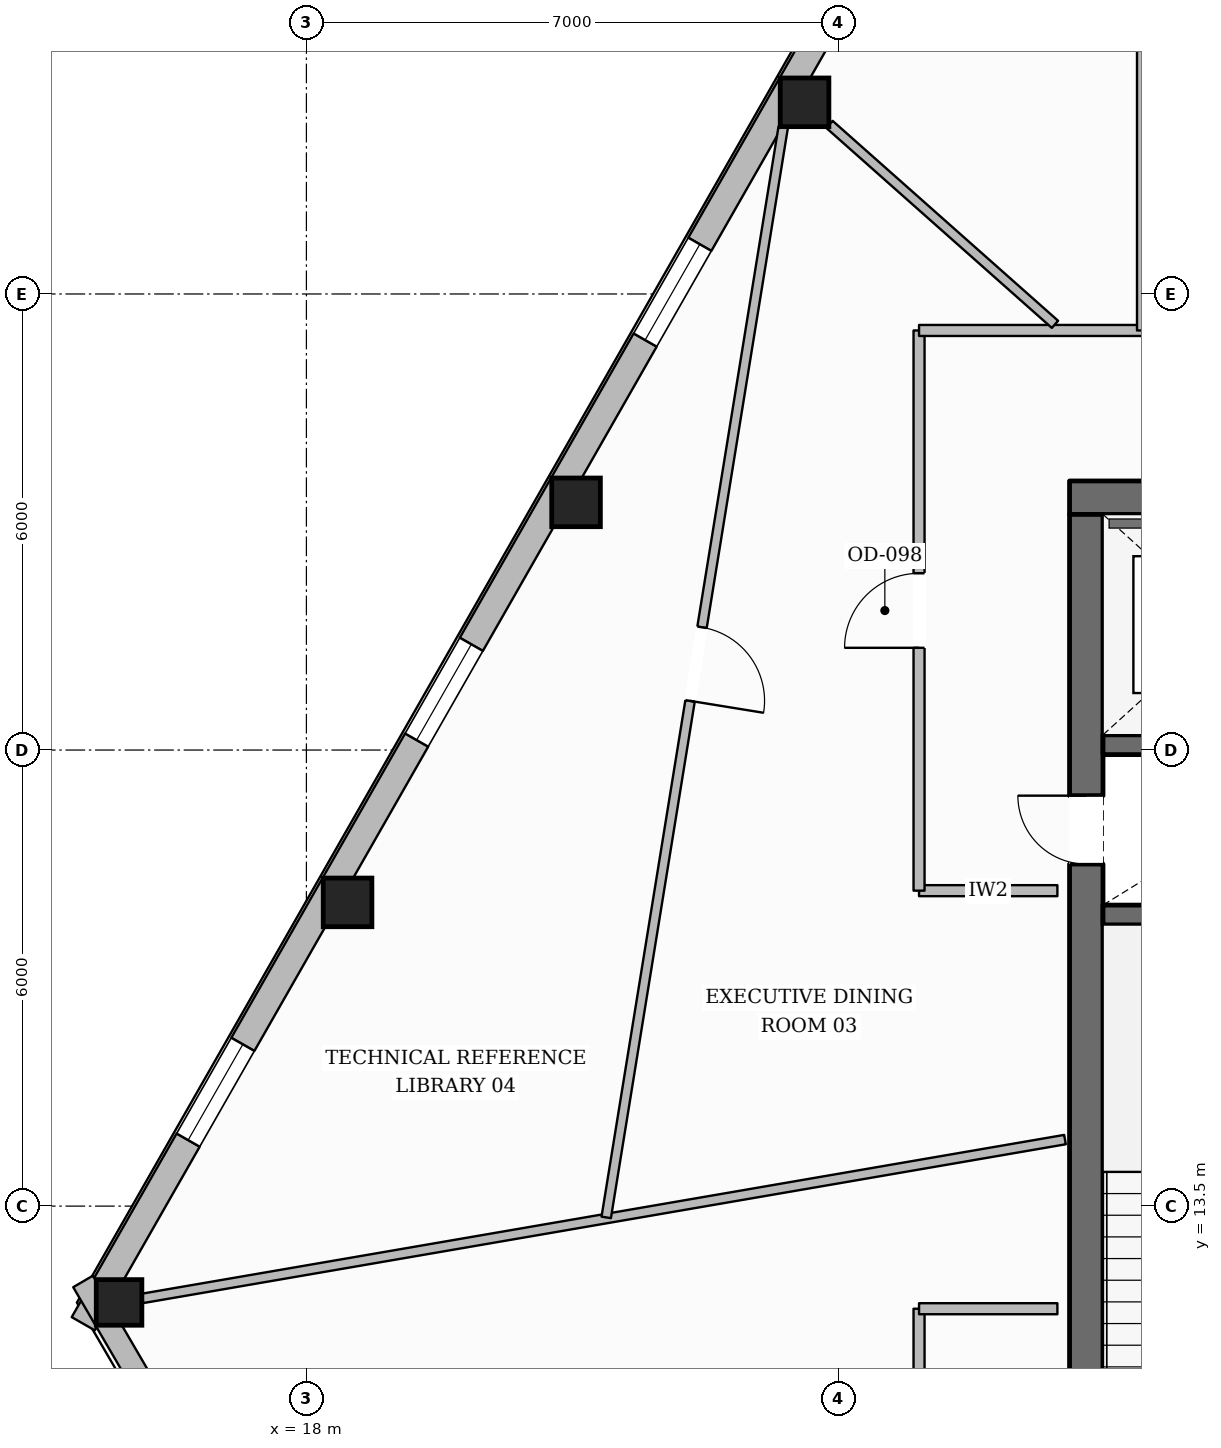
"""IFC4 building model, lengths in metres.
Left out: names, types, materials, properties, quantities, classifications, styles, units other than length and angle.
Written with IfcOpenShell. Run it as: python <this file> out.ifc"""

import sys

from ifc_helpers import new_model, si_unit, direction, frame, frame_2d, origin, origin_2d, place, context, subcontext, project, spatial, rectangle, hollow_rectangle, extrude, element, fill, save


model = new_model("IFC4")
c1 = context("Model", 3, precision=1e-05, world=origin(), true_north=direction((0.0, 1.0)))
c2 = subcontext(c1, "Body", "Model", "MODEL_VIEW")
j1 = project(units=[si_unit("LENGTHUNIT", "METRE"), si_unit("PLANEANGLEUNIT", "RADIAN")], contexts=[c1])
p1 = place(None, origin())
s1 = spatial("IfcSite", under=j1, at=p1, CompositionType="ELEMENT")
p2 = place(p1, origin())
s2 = spatial("IfcBuilding", under=s1, at=p2, CompositionType="ELEMENT")
p3 = place(p2, frame((0.0, 0.0, 188.1)))
s3 = spatial("IfcBuildingStorey", under=s2, at=p3, CompositionType="ELEMENT", Elevation=188.1)
p4 = place(p3, frame((28.04, 22.82, 0.0), z_axis=(0.0, 0.0, 1.0), x_axis=(1.0, 0.0, 0.0)))
e1 = element("IfcWall", 1, at=p4, inside=s3, PredefinedType="SOLIDWALL", context=c2, shape_type="SweptSolid", body=[
    extrude(rectangle(XDim=19.92, YDim=0.44, at=frame_2d((9.96, 0.0))), origin(), (0.0, 0.0, 1.0), 3.6),
])
p5 = place(p4, frame((6.235, 0.0, 0.0)))
e2 = element("IfcOpeningElement", 2, at=p5, cuts=e1, PredefinedType="OPENING", context=c2, shape_type="SweptSolid", body=[
    extrude(rectangle(XDim=1.05, YDim=2.15, at=frame_2d((0.525, 1.075))), frame((0.0, 0.23, 0.0), z_axis=(0.0, -1.0, 0.0), x_axis=(1.0, 0.0, 0.0)), (0.0, 0.0, 1.0), 0.46),
])
p6 = place(p4, frame((12.635, 0.0, 0.0)))
e3 = element("IfcOpeningElement", 3, at=p6, cuts=e1, PredefinedType="OPENING", context=c2, shape_type="SweptSolid", body=[
    extrude(rectangle(XDim=1.05, YDim=2.15, at=frame_2d((0.525, 1.075))), frame((0.0, 0.23, 0.0), z_axis=(0.0, -1.0, 0.0), x_axis=(1.0, 0.0, 0.0)), (0.0, 0.0, 1.0), 0.46),
])
p7 = place(p3, frame((28.26, 9.6, 0.0), z_axis=(0.0, 0.0, 1.0), x_axis=(0.0, 1.0, 0.0)))
e4 = element("IfcWall", 4, at=p7, inside=s3, PredefinedType="SOLIDWALL", context=c2, shape_type="SweptSolid", body=[
    extrude(rectangle(XDim=13.0, YDim=0.44, at=frame_2d((6.5, 0.0))), origin(), (0.0, 0.0, 1.0), 3.6),
])
p8 = place(p7, frame((0.2, 0.0, 0.0)))
e5 = element("IfcOpeningElement", 5, at=p8, cuts=e4, PredefinedType="OPENING", context=c2, shape_type="SweptSolid", body=[
    extrude(rectangle(XDim=1.1, YDim=2.15, at=frame_2d((0.55, 1.075))), frame((0.0, 0.23, 0.0), z_axis=(0.0, -1.0, 0.0), x_axis=(1.0, 0.0, 0.0)), (0.0, 0.0, 1.0), 0.46),
])
p9 = place(p7, frame((8.4, 0.0, 0.0)))
e6 = element("IfcOpeningElement", 6, at=p9, cuts=e4, PredefinedType="OPENING", context=c2, shape_type="SweptSolid", body=[
    extrude(rectangle(XDim=0.9, YDim=2.1, at=frame_2d((0.45, 1.05))), frame((0.0, 0.23, 0.0), z_axis=(0.0, -1.0, 0.0), x_axis=(1.0, 0.0, 0.0)), (0.0, 0.0, 1.0), 0.46),
])
for number, where, z_axis, x_axis in (
    (7, (28.48, 17.33, 0.0), (0.0, 0.0, 1.0), (1.0, 0.0, 0.0)),
    (8, (28.48, 19.57, 0.0), (0.0, 0.0, 1.0), (1.0, 0.0, 0.0)),
):
    element("IfcWall", number, at=place(p3, frame(where, z_axis=z_axis, x_axis=x_axis)), inside=s3, PredefinedType="SHEAR", context=c2, shape_type="SweptSolid", body=[
        extrude(rectangle(XDim=3.2, YDim=0.26, at=frame_2d((1.6, 0.0))), origin(), (0.0, 0.0, 1.0), 3.6),
    ])
for number, where, z_axis, x_axis in (
    (9, (24.554, 28.021, 0.0), (0.0, 0.0, 1.0), (1.0, 0.0, 0.0)),
    (10, (21.548, 22.759, 0.0), (0.0, 0.0, 1.0), (1.0, 0.0, 0.0)),
    (11, (18.542, 17.496, 0.0), (0.0, 0.0, 1.0), (1.0, 0.0, 0.0)),
):
    element("IfcColumn", number, at=place(p3, frame(where, z_axis=z_axis, x_axis=x_axis)), inside=s3, PredefinedType="COLUMN", context=c2, shape_type="SweptSolid", body=[
        extrude(hollow_rectangle(XDim=0.64, YDim=0.64, WallThickness=0.028, at=origin_2d()), origin(), (0.0, 0.0, 1.0), 3.6),
    ])
p10 = place(p3, frame((15.535, 12.233, 0.0), z_axis=(0.0, 0.0, 1.0), x_axis=(1.0, 0.0, 0.0)))
e12 = element("IfcColumn", 12, at=p10, inside=s3, PredefinedType="COLUMN", context=c2, shape_type="SweptSolid", body=[
    extrude(hollow_rectangle(XDim=0.6, YDim=0.6, WallThickness=0.028, at=origin_2d()), origin(), (0.0, 0.0, 1.0), 3.6),
])
p11 = place(p3, frame((15.064, 11.953, 0.0), z_axis=(0.0, 0.0, 1.0), x_axis=(0.495993114815, 0.86832645362, 0.0)))
e13 = element("IfcWall", 13, at=p11, inside=s3, PredefinedType="STANDARD", context=c2, shape_type="SweptSolid", body=[
    extrude(rectangle(XDim=37.324, YDim=0.35, at=frame_2d((18.662, 0.0))), origin(), (0.0, 0.0, 1.0), 3.132),
])
p12 = place(p11, frame((33.087, 0.0, 0.65)))
e14 = element("IfcOpeningElement", 14, at=p12, cuts=e13, PredefinedType="OPENING", context=c2, shape_type="SweptSolid", body=[
    extrude(rectangle(XDim=1.45, YDim=1.75, at=frame_2d((0.725, 0.875))), frame((0.0, 0.185, 0.0), z_axis=(0.0, -1.0, 0.0), x_axis=(1.0, 0.0, 0.0)), (0.0, 0.0, 1.0), 0.37),
])
p13 = place(p11, frame((27.026, 0.0, 0.65)))
e15 = element("IfcOpeningElement", 15, at=p13, cuts=e13, PredefinedType="OPENING", context=c2, shape_type="SweptSolid", body=[
    extrude(rectangle(XDim=1.45, YDim=1.75, at=frame_2d((0.725, 0.875))), frame((0.0, 0.185, 0.0), z_axis=(0.0, -1.0, 0.0), x_axis=(1.0, 0.0, 0.0)), (0.0, 0.0, 1.0), 0.37),
])
p14 = place(p11, frame((14.904, 0.0, 0.65)))
e16 = element("IfcOpeningElement", 16, at=p14, cuts=e13, PredefinedType="OPENING", context=c2, shape_type="SweptSolid", body=[
    extrude(rectangle(XDim=1.45, YDim=1.75, at=frame_2d((0.725, 0.875))), frame((0.0, 0.185, 0.0), z_axis=(0.0, -1.0, 0.0), x_axis=(1.0, 0.0, 0.0)), (0.0, 0.0, 1.0), 0.37),
])
p15 = place(p11, frame((8.844, 0.0, 0.65)))
e17 = element("IfcOpeningElement", 17, at=p15, cuts=e13, PredefinedType="OPENING", context=c2, shape_type="SweptSolid", body=[
    extrude(rectangle(XDim=1.45, YDim=1.75, at=frame_2d((0.725, 0.875))), frame((0.0, 0.185, 0.0), z_axis=(0.0, -1.0, 0.0), x_axis=(1.0, 0.0, 0.0)), (0.0, 0.0, 1.0), 0.37),
])
p16 = place(p11, frame((2.782, 0.0, 0.65)))
e18 = element("IfcOpeningElement", 18, at=p16, cuts=e13, PredefinedType="OPENING", context=c2, shape_type="SweptSolid", body=[
    extrude(rectangle(XDim=1.45, YDim=1.75, at=frame_2d((0.725, 0.875))), frame((0.0, 0.185, 0.0), z_axis=(0.0, -1.0, 0.0), x_axis=(1.0, 0.0, 0.0)), (0.0, 0.0, 1.0), 0.37),
])
p17 = place(p3, frame((20.12, 3.839, 0.0), z_axis=(0.0, 0.0, 1.0), x_axis=(-0.503937564299, 0.863740083178, 0.0)))
e19 = element("IfcWall", 19, at=p17, inside=s3, PredefinedType="STANDARD", context=c2, shape_type="SweptSolid", body=[
    extrude(rectangle(XDim=10.038, YDim=0.3, at=frame_2d((5.019, 0.0))), origin(), (0.0, 0.0, 1.0), 3.132),
])
p18 = place(p17, frame((4.494, 0.0, 0.65)))
e20 = element("IfcOpeningElement", 20, at=p18, cuts=e19, PredefinedType="OPENING", context=c2, shape_type="SweptSolid", body=[
    extrude(rectangle(XDim=1.05, YDim=1.7, at=frame_2d((0.525, 0.85))), frame((0.0, 0.16, 0.0), z_axis=(0.0, -1.0, 0.0), x_axis=(1.0, 0.0, 0.0)), (0.0, 0.0, 1.0), 0.32),
])
p19 = place(p3, frame((27.88, 17.65, 0.0), z_axis=(0.0, 0.0, 1.0), x_axis=(-1.0, 0.0, 0.0)))
e21 = element("IfcWall", 21, at=p19, inside=s3, PredefinedType="PARTITIONING", context=c2, shape_type="SweptSolid", body=[
    extrude(rectangle(XDim=1.82, YDim=0.145, at=frame_2d((0.91, 0.0))), origin(), (0.0, 0.0, 1.0), 3.141),
])
p20 = place(p3, frame((26.06, 17.65, 0.0), z_axis=(0.0, 0.0, 1.0), x_axis=(0.0, 1.0, 0.0)))
e22 = element("IfcWall", 22, at=p20, inside=s3, PredefinedType="PARTITIONING", context=c2, shape_type="SweptSolid", body=[
    extrude(rectangle(XDim=7.37, YDim=0.145, at=frame_2d((3.685, 0.0))), origin(), (0.0, 0.0, 1.0), 3.339),
])
p21 = place(p20, frame((3.195, 0.0, 0.0)))
e23 = element("IfcOpeningElement", 23, at=p21, cuts=e22, PredefinedType="OPENING", context=c2, shape_type="SweptSolid", body=[
    extrude(rectangle(XDim=0.98, YDim=2.15, at=frame_2d((0.49, 1.075))), frame((0.0, 0.083, 0.0), z_axis=(0.0, -1.0, 0.0), x_axis=(1.0, 0.0, 0.0)), (0.0, 0.0, 1.0), 0.165),
])
p22 = place(p3, frame((26.06, 25.02, 0.0), z_axis=(0.0, 0.0, 1.0), x_axis=(1.0, 0.0, 0.0)))
e24 = element("IfcWall", 24, at=p22, inside=s3, PredefinedType="PARTITIONING", context=c2, shape_type="SweptSolid", body=[
    extrude(rectangle(XDim=2.94, YDim=0.145, at=frame_2d((1.47, 0.0))), origin(), (0.0, 0.0, 1.0), 3.6),
])
p23 = place(p3, frame((29.0, 25.02, 0.0), z_axis=(0.0, 0.0, 1.0), x_axis=(0.0, 1.0, 0.0)))
e25 = element("IfcWall", 25, at=p23, inside=s3, PredefinedType="PARTITIONING", context=c2, shape_type="SweptSolid", body=[
    extrude(rectangle(XDim=8.662, YDim=0.145, at=frame_2d((4.331, 0.0))), origin(), (0.0, 0.0, 1.0), 3.6),
])
p24 = place(p3, frame((26.06, 7.18, 0.0), z_axis=(0.0, 0.0, 1.0), x_axis=(0.0, 1.0, 0.0)))
e26 = element("IfcWall", 26, at=p24, inside=s3, PredefinedType="PARTITIONING", context=c2, shape_type="SweptSolid", body=[
    extrude(rectangle(XDim=4.97, YDim=0.145, at=frame_2d((2.485, 0.0))), origin(), (0.0, 0.0, 1.0), 3.6),
])
p25 = place(p24, frame((1.785, 0.0, 0.0)))
e27 = element("IfcOpeningElement", 27, at=p25, cuts=e26, PredefinedType="OPENING", context=c2, shape_type="SweptSolid", body=[
    extrude(rectangle(XDim=1.4, YDim=2.2, at=frame_2d((0.7, 1.1))), frame((0.0, 0.083, 0.0), z_axis=(0.0, -1.0, 0.0), x_axis=(1.0, 0.0, 0.0)), (0.0, 0.0, 1.0), 0.165),
])
p26 = place(p3, frame((26.06, 12.15, 0.0), z_axis=(0.0, 0.0, 1.0), x_axis=(1.0, 0.0, 0.0)))
e28 = element("IfcWall", 28, at=p26, inside=s3, PredefinedType="PARTITIONING", context=c2, shape_type="SweptSolid", body=[
    extrude(rectangle(XDim=1.82, YDim=0.145, at=frame_2d((0.91, 0.0))), origin(), (0.0, 0.0, 1.0), 3.141),
])
p27 = place(p3, frame((27.848, 25.101, 0.0), z_axis=(0.0, 0.0, 1.0), x_axis=(-0.748288582972, 0.66337334631, 0.0)))
e29 = element("IfcWall", 29, at=p27, inside=s3, PredefinedType="PARTITIONING", context=c2, shape_type="SweptSolid", body=[
    extrude(rectangle(XDim=3.965, YDim=0.125, at=frame_2d((1.982, 0.0))), origin(), (0.0, 0.0, 1.0), 3.141),
])
p28 = place(p3, frame((27.98, 14.375, 0.0), z_axis=(0.0, 0.0, 1.0), x_axis=(-0.9855033492, -0.169655971646, 0.0)))
e30 = element("IfcWall", 30, at=p28, inside=s3, PredefinedType="PARTITIONING", context=c2, shape_type="SweptSolid", body=[
    extrude(rectangle(XDim=12.315, YDim=0.125, at=frame_2d((6.158, 0.0))), origin(), (0.0, 0.0, 1.0), 3.141),
])
p29 = place(p3, frame((24.273, 27.694, 0.0), z_axis=(0.0, 0.0, 1.0), x_axis=(-0.160245052552, -0.987077263, 0.0)))
e31 = element("IfcWall", 31, at=p29, inside=s3, PredefinedType="PARTITIONING", context=c2, shape_type="SweptSolid", body=[
    extrude(rectangle(XDim=14.53, YDim=0.125, at=frame_2d((7.265, 0.0))), origin(), (0.0, 0.0, 1.0), 3.135),
])
p30 = place(p29, frame((6.665, 0.0, 0.0)))
e32 = element("IfcOpeningElement", 32, at=p30, cuts=e31, PredefinedType="OPENING", context=c2, shape_type="SweptSolid", body=[
    extrude(rectangle(XDim=0.98, YDim=2.15, at=frame_2d((0.49, 1.075))), frame((0.0, 0.073, 0.0), z_axis=(0.0, -1.0, 0.0), x_axis=(1.0, 0.0, 0.0)), (0.0, 0.0, 1.0), 0.145),
])
p31 = place(p14, origin())
e33 = element("IfcWindow", 33, at=p31, inside=s3, PartitioningType="SINGLE_PANEL", PredefinedType="WINDOW", context=c2, shape_type="SweptSolid", body=[
    extrude(rectangle(XDim=1.45, YDim=1.75, at=frame_2d((0.725, 0.875))), frame((0.0, 0.03, 0.0), z_axis=(0.0, -1.0, 0.0), x_axis=(1.0, 0.0, 0.0)), (0.0, 0.0, 1.0), 0.06),
])
fill(e16, e33)
p32 = place(p15, origin())
e34 = element("IfcWindow", 34, at=p32, inside=s3, PartitioningType="SINGLE_PANEL", PredefinedType="WINDOW", context=c2, shape_type="SweptSolid", body=[
    extrude(rectangle(XDim=1.45, YDim=1.75, at=frame_2d((0.725, 0.875))), frame((0.0, 0.03, 0.0), z_axis=(0.0, -1.0, 0.0), x_axis=(1.0, 0.0, 0.0)), (0.0, 0.0, 1.0), 0.06),
])
fill(e17, e34)
p33 = place(p16, origin())
e35 = element("IfcWindow", 35, at=p33, inside=s3, PartitioningType="SINGLE_PANEL", PredefinedType="WINDOW", context=c2, shape_type="SweptSolid", body=[
    extrude(rectangle(XDim=1.45, YDim=1.75, at=frame_2d((0.725, 0.875))), frame((0.0, 0.03, 0.0), z_axis=(0.0, -1.0, 0.0), x_axis=(1.0, 0.0, 0.0)), (0.0, 0.0, 1.0), 0.06),
])
fill(e18, e35)
p34 = place(p9, origin())
e36 = element("IfcDoor", 36, at=p34, inside=s3, OperationType="SINGLE_SWING_RIGHT", PredefinedType="DOOR", context=c2, shape_type="SweptSolid", body=[
    extrude(rectangle(XDim=0.9, YDim=2.1, at=frame_2d((0.45, 1.05))), frame((0.0, 0.025, 0.0), z_axis=(0.0, -1.0, 0.0), x_axis=(1.0, 0.0, 0.0)), (0.0, 0.0, 1.0), 0.05),
])
fill(e6, e36)
p35 = place(p21, origin())
e37 = element("IfcDoor", 37, at=p35, inside=s3, OperationType="SINGLE_SWING_LEFT", PredefinedType="DOOR", context=c2, shape_type="SweptSolid", body=[
    extrude(rectangle(XDim=0.98, YDim=2.15, at=frame_2d((0.49, 1.075))), frame((0.0, 0.025, 0.0), z_axis=(0.0, -1.0, 0.0), x_axis=(1.0, 0.0, 0.0)), (0.0, 0.0, 1.0), 0.05),
])
fill(e23, e37)
p36 = place(p30, origin())
e38 = element("IfcDoor", 38, at=p36, inside=s3, OperationType="SINGLE_SWING_RIGHT", PredefinedType="DOOR", context=c2, shape_type="SweptSolid", body=[
    extrude(rectangle(XDim=0.98, YDim=2.15, at=frame_2d((0.49, 1.075))), frame((0.0, 0.025, 0.0), z_axis=(0.0, -1.0, 0.0), x_axis=(1.0, 0.0, 0.0)), (0.0, 0.0, 1.0), 0.05),
])
fill(e32, e38)
save(model, sys.argv[1])
